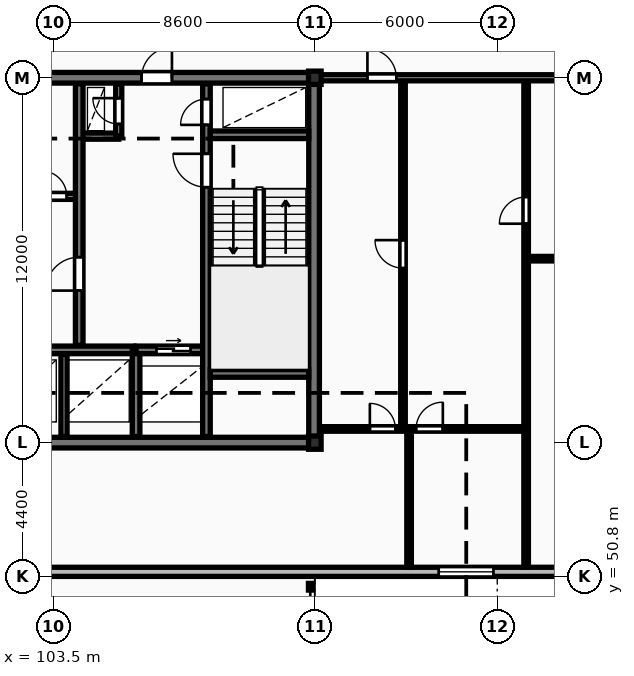
"""IFC4 building model, lengths in metres.
Left out: names, types, materials, properties, quantities, classifications, styles, units other than length and angle.
Written with IfcOpenShell. Run it as: python <this file> out.ifc"""

import sys

from ifc_helpers import new_model, si_unit, direction, frame, frame_2d, origin, origin_2d, place, context, subcontext, project, spatial, rectangle, i_section, extrude, element, fill, save


model = new_model("IFC4")
c1 = context("Model", 3, precision=1e-05, world=origin(), true_north=direction((0.0, 1.0)))
c2 = subcontext(c1, "Body", "Model", "MODEL_VIEW")
j1 = project(units=[si_unit("LENGTHUNIT", "METRE"), si_unit("PLANEANGLEUNIT", "RADIAN")], contexts=[c1])
p1 = place(None, origin())
s1 = spatial("IfcSite", under=j1, at=p1, CompositionType="ELEMENT")
p2 = place(p1, origin())
s2 = spatial("IfcBuilding", under=s1, at=p2, CompositionType="ELEMENT")
p3 = place(p2, frame((0.0, 0.0, 150.1)))
s3 = spatial("IfcBuildingStorey", under=s2, at=p3, CompositionType="ELEMENT", Elevation=150.1)
for number, where, z_axis, x_axis in (
    (1, (112.1, 55.2, 0.0), (0.0, 0.0, 1.0), (1.0, 0.0, 0.0)),
    (2, (112.1, 67.2, 0.0), (0.0, 0.0, 1.0), (1.0, 0.0, 0.0)),
):
    element("IfcColumn", number, at=place(p3, frame(where, z_axis=z_axis, x_axis=x_axis)), inside=s3, PredefinedType="COLUMN", context=c2, shape_type="SweptSolid", body=[
        extrude(i_section(OverallWidth=0.412, OverallDepth=0.437, WebThickness=0.036, FlangeThickness=0.052, FilletRadius=0.015, at=origin_2d()), origin(), (0.0, 0.0, 1.0), 3.6),
    ])
p4 = place(p3, frame((57.6, 50.95, 0.0), z_axis=(0.0, 0.0, 1.0), x_axis=(1.0, 0.0, 0.0)))
e3 = element("IfcWall", 3, at=p4, inside=s3, PredefinedType="STANDARD", context=c2, shape_type="SweptSolid", body=[
    extrude(rectangle(XDim=73.0, YDim=0.3, at=frame_2d((36.5, 0.0))), origin(), (0.0, 0.0, 1.0), 3.31),
])
p5 = place(p4, frame((15.225, 0.0, 0.85)))
e4 = element("IfcOpeningElement", 4, at=p5, cuts=e3, PredefinedType="OPENING", context=c2, shape_type="SweptSolid", body=[
    extrude(rectangle(XDim=1.8, YDim=1.8, at=frame_2d((0.9, 0.9))), frame((0.0, 0.16, 0.0), z_axis=(0.0, -1.0, 0.0), x_axis=(1.0, 0.0, 0.0)), (0.0, 0.0, 1.0), 0.32),
])
p6 = place(p4, frame((58.575, 0.0, 0.85)))
e5 = element("IfcOpeningElement", 5, at=p6, cuts=e3, PredefinedType="OPENING", context=c2, shape_type="SweptSolid", body=[
    extrude(rectangle(XDim=1.8, YDim=1.8, at=frame_2d((0.9, 0.9))), frame((0.0, 0.16, 0.0), z_axis=(0.0, -1.0, 0.0), x_axis=(1.0, 0.0, 0.0)), (0.0, 0.0, 1.0), 0.32),
])
p7 = place(p4, frame((33.45, 0.0, 0.0)))
e6 = element("IfcOpeningElement", 6, at=p7, cuts=e3, PredefinedType="OPENING", context=c2, shape_type="SweptSolid", body=[
    extrude(rectangle(XDim=1.1, YDim=2.1, at=frame_2d((0.55, 1.05))), frame((0.0, 0.16, 0.0), z_axis=(0.0, -1.0, 0.0), x_axis=(1.0, 0.0, 0.0)), (0.0, 0.0, 1.0), 0.32),
])
p8 = place(p3, frame((75.95, 55.2, 0.0), z_axis=(0.0, 0.0, 1.0), x_axis=(1.0, 0.0, 0.0)))
e7 = element("IfcWall", 7, at=p8, inside=s3, PredefinedType="SHEAR", context=c2, shape_type="SweptSolid", body=[
    extrude(rectangle(XDim=36.3, YDim=0.35, at=frame_2d((18.15, 0.0))), origin(), (0.0, 0.0, 1.0), 3.6),
])
p9 = place(p8, frame((15.1, 0.0, 0.0)))
e8 = element("IfcOpeningElement", 8, at=p9, cuts=e7, PredefinedType="OPENING", context=c2, shape_type="SweptSolid", body=[
    extrude(rectangle(XDim=1.1, YDim=2.1, at=frame_2d((0.55, 1.05))), frame((0.0, 0.185, 0.0), z_axis=(0.0, -1.0, 0.0), x_axis=(1.0, 0.0, 0.0)), (0.0, 0.0, 1.0), 0.37),
])
p10 = place(p3, frame((112.075, 55.375, 0.0), z_axis=(0.0, 0.0, 1.0), x_axis=(0.0, 1.0, 0.0)))
e9 = element("IfcWall", 9, at=p10, inside=s3, PredefinedType="SHEAR", context=c2, shape_type="SweptSolid", body=[
    extrude(rectangle(XDim=11.65, YDim=0.35, at=frame_2d((5.825, 0.0))), origin(), (0.0, 0.0, 1.0), 3.6),
])
p11 = place(p3, frame((75.95, 67.2, 0.0), z_axis=(0.0, 0.0, 1.0), x_axis=(1.0, 0.0, 0.0)))
e10 = element("IfcWall", 10, at=p11, inside=s3, PredefinedType="SHEAR", context=c2, shape_type="SweptSolid", body=[
    extrude(rectangle(XDim=36.3, YDim=0.35, at=frame_2d((18.15, 0.0))), origin(), (0.0, 0.0, 1.0), 3.6),
])
p12 = place(p11, frame((5.25, 0.0, 0.0)))
e11 = element("IfcOpeningElement", 11, at=p12, cuts=e10, PredefinedType="OPENING", context=c2, shape_type="SweptSolid", body=[
    extrude(rectangle(XDim=1.0, YDim=2.15, at=frame_2d((0.5, 1.075))), frame((0.0, 0.185, 0.0), z_axis=(0.0, -1.0, 0.0), x_axis=(1.0, 0.0, 0.0)), (0.0, 0.0, 1.0), 0.37),
])
p13 = place(p11, frame((21.6, 0.0, 0.0)))
e12 = element("IfcOpeningElement", 12, at=p13, cuts=e10, PredefinedType="OPENING", context=c2, shape_type="SweptSolid", body=[
    extrude(rectangle(XDim=1.5, YDim=2.2, at=frame_2d((0.75, 1.1))), frame((0.0, 0.185, 0.0), z_axis=(0.0, -1.0, 0.0), x_axis=(1.0, 0.0, 0.0)), (0.0, 0.0, 1.0), 0.37),
])
p14 = place(p11, frame((30.45, 0.0, 0.0)))
e13 = element("IfcOpeningElement", 13, at=p14, cuts=e10, PredefinedType="OPENING", context=c2, shape_type="SweptSolid", body=[
    extrude(rectangle(XDim=1.0, YDim=2.15, at=frame_2d((0.5, 1.075))), frame((0.0, 0.185, 0.0), z_axis=(0.0, -1.0, 0.0), x_axis=(1.0, 0.0, 0.0)), (0.0, 0.0, 1.0), 0.37),
])
p15 = place(p3, frame((103.85, 55.4, 0.0), z_axis=(0.0, 0.0, 1.0), x_axis=(0.0, 1.0, 0.0)))
e14 = element("IfcWall", 14, at=p15, inside=s3, PredefinedType="PARTITIONING", context=c2, shape_type="SweptSolid", body=[
    extrude(rectangle(XDim=2.72, YDim=0.2, at=frame_2d((1.36, 0.0))), origin(), (0.0, 0.0, 1.0), 3.31),
])
p16 = place(p3, frame((101.55, 58.25, 0.0), z_axis=(0.0, 0.0, 1.0), x_axis=(1.0, 0.0, 0.0)))
e15 = element("IfcWall", 15, at=p16, inside=s3, PredefinedType="SHEAR", context=c2, shape_type="SweptSolid", body=[
    extrude(rectangle(XDim=4.6, YDim=0.25, at=frame_2d((2.3, 0.0))), origin(), (0.0, 0.0, 1.0), 3.6),
])
p17 = place(p3, frame((106.22, 55.4, 0.0), z_axis=(0.0, 0.0, 1.0), x_axis=(0.0, 1.0, 0.0)))
e16 = element("IfcWall", 16, at=p17, inside=s3, PredefinedType="SHEAR", context=c2, shape_type="SweptSolid", body=[
    extrude(rectangle(XDim=2.85, YDim=0.25, at=frame_2d((1.425, 0.0))), origin(), (0.0, 0.0, 1.0), 3.6),
])
p18 = place(p3, frame((106.22, 58.25, 0.0), z_axis=(0.0, 0.0, 1.0), x_axis=(1.0, 0.0, 0.0)))
e17 = element("IfcWall", 17, at=p18, inside=s3, PredefinedType="SHEAR", context=c2, shape_type="SweptSolid", body=[
    extrude(rectangle(XDim=2.46, YDim=0.25, at=frame_2d((1.23, 0.0))), origin(), (0.0, 0.0, 1.0), 3.6),
])
p19 = place(p18, frame((0.67, 0.0, 0.0)))
e18 = element("IfcOpeningElement", 18, at=p19, cuts=e17, PredefinedType="OPENING", context=c2, shape_type="SweptSolid", body=[
    extrude(rectangle(XDim=1.12, YDim=2.12, at=frame_2d((0.56, 1.06))), frame((0.0, 0.135, 0.0), z_axis=(0.0, -1.0, 0.0), x_axis=(1.0, 0.0, 0.0)), (0.0, 0.0, 1.0), 0.27),
])
p20 = place(p3, frame((84.42, 63.3, 0.0), z_axis=(0.0, 0.0, 1.0), x_axis=(1.0, 0.0, 0.0)))
e19 = element("IfcWall", 19, at=p20, inside=s3, PredefinedType="PARTITIONING", context=c2, shape_type="SweptSolid", body=[
    extrude(rectangle(XDim=19.83, YDim=0.2, at=frame_2d((9.915, 0.0))), origin(), (0.0, 0.0, 1.0), 3.31),
])
p21 = place(p20, frame((1.15, 0.0, 0.0)))
e20 = element("IfcOpeningElement", 20, at=p21, cuts=e19, PredefinedType="OPENING", context=c2, shape_type="SweptSolid", body=[
    extrude(rectangle(XDim=0.85, YDim=2.05, at=frame_2d((0.425, 1.025))), frame((0.0, 0.11, 0.0), z_axis=(0.0, -1.0, 0.0), x_axis=(1.0, 0.0, 0.0)), (0.0, 0.0, 1.0), 0.22),
])
p22 = place(p20, frame((3.25, 0.0, 0.0)))
e21 = element("IfcOpeningElement", 21, at=p22, cuts=e19, PredefinedType="OPENING", context=c2, shape_type="SweptSolid", body=[
    extrude(rectangle(XDim=0.85, YDim=2.05, at=frame_2d((0.425, 1.025))), frame((0.0, 0.11, 0.0), z_axis=(0.0, -1.0, 0.0), x_axis=(1.0, 0.0, 0.0)), (0.0, 0.0, 1.0), 0.22),
])
p23 = place(p20, frame((13.08, 0.0, 0.0)))
e22 = element("IfcOpeningElement", 22, at=p23, cuts=e19, PredefinedType="OPENING", context=c2, shape_type="SweptSolid", body=[
    extrude(rectangle(XDim=1.5, YDim=2.2, at=frame_2d((0.75, 1.1))), frame((0.0, 0.11, 0.0), z_axis=(0.0, -1.0, 0.0), x_axis=(1.0, 0.0, 0.0)), (0.0, 0.0, 1.0), 0.22),
])
p24 = place(p20, frame((5.53, 0.0, 0.0)))
e23 = element("IfcOpeningElement", 23, at=p24, cuts=e19, PredefinedType="OPENING", context=c2, shape_type="SweptSolid", body=[
    extrude(rectangle(XDim=0.88, YDim=2.06, at=frame_2d((0.44, 1.03))), frame((0.0, 0.11, 0.0), z_axis=(0.0, -1.0, 0.0), x_axis=(1.0, 0.0, 0.0)), (0.0, 0.0, 1.0), 0.22),
])
p25 = place(p20, frame((7.68, 0.0, 0.0)))
e24 = element("IfcOpeningElement", 24, at=p25, cuts=e19, PredefinedType="OPENING", context=c2, shape_type="SweptSolid", body=[
    extrude(rectangle(XDim=0.88, YDim=2.06, at=frame_2d((0.44, 1.03))), frame((0.0, 0.11, 0.0), z_axis=(0.0, -1.0, 0.0), x_axis=(1.0, 0.0, 0.0)), (0.0, 0.0, 1.0), 0.22),
])
p26 = place(p20, frame((10.43, 0.0, 0.0)))
e25 = element("IfcOpeningElement", 25, at=p26, cuts=e19, PredefinedType="OPENING", context=c2, shape_type="SweptSolid", body=[
    extrude(rectangle(XDim=0.85, YDim=2.05, at=frame_2d((0.425, 1.025))), frame((0.0, 0.11, 0.0), z_axis=(0.0, -1.0, 0.0), x_axis=(1.0, 0.0, 0.0)), (0.0, 0.0, 1.0), 0.22),
])
p27 = place(p20, frame((16.23, 0.0, 0.0)))
e26 = element("IfcOpeningElement", 26, at=p27, cuts=e19, PredefinedType="OPENING", context=c2, shape_type="SweptSolid", body=[
    extrude(rectangle(XDim=0.96, YDim=2.1, at=frame_2d((0.48, 1.05))), frame((0.0, 0.11, 0.0), z_axis=(0.0, -1.0, 0.0), x_axis=(1.0, 0.0, 0.0)), (0.0, 0.0, 1.0), 0.22),
])
p28 = place(p20, frame((18.68, 0.0, 0.0)))
e27 = element("IfcOpeningElement", 27, at=p28, cuts=e19, PredefinedType="OPENING", context=c2, shape_type="SweptSolid", body=[
    extrude(rectangle(XDim=0.84, YDim=2.04, at=frame_2d((0.42, 1.02))), frame((0.0, 0.11, 0.0), z_axis=(0.0, -1.0, 0.0), x_axis=(1.0, 0.0, 0.0)), (0.0, 0.0, 1.0), 0.22),
])
p29 = place(p3, frame((104.45, 65.28, 0.0), z_axis=(0.0, 0.0, 1.0), x_axis=(1.0, 0.0, 0.0)))
e28 = element("IfcWall", 28, at=p29, inside=s3, PredefinedType="PARTITIONING", context=c2, shape_type="SweptSolid", body=[
    extrude(rectangle(XDim=1.2, YDim=0.2, at=frame_2d((0.6, 0.0))), origin(), (0.0, 0.0, 1.0), 3.31),
])
p30 = place(p3, frame((105.65, 65.28, 0.0), z_axis=(0.0, 0.0, 1.0), x_axis=(0.0, 1.0, 0.0)))
e29 = element("IfcWall", 29, at=p30, inside=s3, PredefinedType="PARTITIONING", context=c2, shape_type="SweptSolid", body=[
    extrude(rectangle(XDim=1.72, YDim=0.2, at=frame_2d((0.86, 0.0))), origin(), (0.0, 0.0, 1.0), 3.31),
])
p31 = place(p30, frame((0.4, 0.0, 0.0)))
e30 = element("IfcOpeningElement", 30, at=p31, cuts=e29, PredefinedType="OPENING", context=c2, shape_type="SweptSolid", body=[
    extrude(rectangle(XDim=0.85, YDim=2.05, at=frame_2d((0.425, 1.025))), frame((0.0, 0.11, 0.0), z_axis=(0.0, -1.0, 0.0), x_axis=(1.0, 0.0, 0.0)), (0.0, 0.0, 1.0), 0.22),
])
p32 = place(p3, frame((104.35, 58.4, 0.0), z_axis=(0.0, 0.0, 1.0), x_axis=(0.0, 1.0, 0.0)))
e31 = element("IfcWall", 31, at=p32, inside=s3, PredefinedType="SHEAR", context=c2, shape_type="SweptSolid", body=[
    extrude(rectangle(XDim=8.6, YDim=0.25, at=frame_2d((4.3, 0.0))), origin(), (0.0, 0.0, 1.0), 3.6),
])
p33 = place(p32, frame((1.8, 0.0, 0.0)))
e32 = element("IfcOpeningElement", 32, at=p33, cuts=e31, PredefinedType="OPENING", context=c2, shape_type="SweptSolid", body=[
    extrude(rectangle(XDim=1.1, YDim=2.1, at=frame_2d((0.55, 1.05))), frame((0.0, 0.135, 0.0), z_axis=(0.0, -1.0, 0.0), x_axis=(1.0, 0.0, 0.0)), (0.0, 0.0, 1.0), 0.27),
])
p34 = place(p3, frame((108.535, 55.4, 0.0), z_axis=(0.0, 0.0, 1.0), x_axis=(0.0, 1.0, 0.0)))
e33 = element("IfcWall", 33, at=p34, inside=s3, PredefinedType="SHEAR", context=c2, shape_type="SweptSolid", body=[
    extrude(rectangle(XDim=11.6, YDim=0.25, at=frame_2d((5.8, 0.0))), origin(), (0.0, 0.0, 1.0), 3.6),
])
p35 = place(p34, frame((8.2, 0.0, 0.0)))
e34 = element("IfcOpeningElement", 34, at=p35, cuts=e33, PredefinedType="OPENING", context=c2, shape_type="SweptSolid", body=[
    extrude(rectangle(XDim=1.1, YDim=2.1, at=frame_2d((0.55, 1.05))), frame((0.0, 0.135, 0.0), z_axis=(0.0, -1.0, 0.0), x_axis=(1.0, 0.0, 0.0)), (0.0, 0.0, 1.0), 0.27),
])
p36 = place(p34, frame((10.25, 0.0, 0.0)))
e35 = element("IfcOpeningElement", 35, at=p36, cuts=e33, PredefinedType="OPENING", context=c2, shape_type="SweptSolid", body=[
    extrude(rectangle(XDim=0.85, YDim=2.05, at=frame_2d((0.425, 1.025))), frame((0.0, 0.135, 0.0), z_axis=(0.0, -1.0, 0.0), x_axis=(1.0, 0.0, 0.0)), (0.0, 0.0, 1.0), 0.27),
])
for number, where, z_axis, x_axis in (
    (36, (108.66, 57.475, 0.0), (0.0, 0.0, 1.0), (1.0, 0.0, 0.0)),
    (37, (108.66, 65.325, 0.0), (0.0, 0.0, 1.0), (1.0, 0.0, 0.0)),
):
    element("IfcWall", number, at=place(p3, frame(where, z_axis=z_axis, x_axis=x_axis)), inside=s3, PredefinedType="SHEAR", context=c2, shape_type="SweptSolid", body=[
        extrude(rectangle(XDim=3.24, YDim=0.25, at=frame_2d((1.62, 0.0))), origin(), (0.0, 0.0, 1.0), 3.6),
    ])
p37 = place(p3, frame((119.05, 61.25, 0.0), z_axis=(0.0, 0.0, 1.0), x_axis=(1.0, 0.0, 0.0)))
e38 = element("IfcWall", 38, at=p37, inside=s3, PredefinedType="PARTITIONING", context=c2, shape_type="SweptSolid", body=[
    extrude(rectangle(XDim=11.55, YDim=0.15, at=frame_2d((5.775, 0.0))), origin(), (0.0, 0.0, 1.0), 3.31),
])
p38 = place(p37, frame((5.355, 0.0, 0.0)))
e39 = element("IfcOpeningElement", 39, at=p38, cuts=e38, PredefinedType="OPENING", context=c2, shape_type="SweptSolid", body=[
    extrude(rectangle(XDim=0.84, YDim=2.04, at=frame_2d((0.42, 1.02))), frame((0.0, 0.085, 0.0), z_axis=(0.0, -1.0, 0.0), x_axis=(1.0, 0.0, 0.0)), (0.0, 0.0, 1.0), 0.17),
])
p39 = place(p3, frame((119.05, 51.1, 0.0), z_axis=(0.0, 0.0, 1.0), x_axis=(0.0, 1.0, 0.0)))
e40 = element("IfcWall", 40, at=p39, inside=s3, PredefinedType="PARTITIONING", context=c2, shape_type="SweptSolid", body=[
    extrude(rectangle(XDim=16.05, YDim=0.15, at=frame_2d((8.025, 0.0))), origin(), (0.0, 0.0, 1.0), 3.31),
])
p40 = place(p39, frame((11.3, 0.0, 0.0)))
e41 = element("IfcOpeningElement", 41, at=p40, cuts=e40, PredefinedType="OPENING", context=c2, shape_type="SweptSolid", body=[
    extrude(rectangle(XDim=0.88, YDim=2.06, at=frame_2d((0.44, 1.03))), frame((0.0, 0.085, 0.0), z_axis=(0.0, -1.0, 0.0), x_axis=(1.0, 0.0, 0.0)), (0.0, 0.0, 1.0), 0.17),
])
p41 = place(p3, frame((115.0, 55.65, 0.0), z_axis=(0.0, 0.0, 1.0), x_axis=(0.0, 1.0, 0.0)))
e42 = element("IfcWall", 42, at=p41, inside=s3, PredefinedType="PARTITIONING", context=c2, shape_type="SweptSolid", body=[
    extrude(rectangle(XDim=11.5, YDim=0.15, at=frame_2d((5.75, 0.0))), origin(), (0.0, 0.0, 1.0), 3.31),
])
p42 = place(p41, frame((5.29, 0.0, 0.0)))
e43 = element("IfcOpeningElement", 43, at=p42, cuts=e42, PredefinedType="OPENING", context=c2, shape_type="SweptSolid", body=[
    extrude(rectangle(XDim=0.92, YDim=2.08, at=frame_2d((0.46, 1.04))), frame((0.0, 0.085, 0.0), z_axis=(0.0, -1.0, 0.0), x_axis=(1.0, 0.0, 0.0)), (0.0, 0.0, 1.0), 0.17),
])
p43 = place(p3, frame((115.2, 51.1, 0.0), z_axis=(0.0, 0.0, 1.0), x_axis=(0.0, 1.0, 0.0)))
e44 = element("IfcWall", 44, at=p43, inside=s3, PredefinedType="PARTITIONING", context=c2, shape_type="SweptSolid", body=[
    extrude(rectangle(XDim=4.55, YDim=0.15, at=frame_2d((2.275, 0.0))), origin(), (0.0, 0.0, 1.0), 3.31),
])
p44 = place(p3, frame((112.27, 55.65, 0.0), z_axis=(0.0, 0.0, 1.0), x_axis=(1.0, 0.0, 0.0)))
e45 = element("IfcWall", 45, at=p44, inside=s3, PredefinedType="PARTITIONING", context=c2, shape_type="SweptSolid", body=[
    extrude(rectangle(XDim=6.76, YDim=0.15, at=frame_2d((3.38, 0.0))), origin(), (0.0, 0.0, 1.0), 3.31),
])
p45 = place(p44, frame((1.64, 0.0, 0.0)))
e46 = element("IfcOpeningElement", 46, at=p45, cuts=e45, PredefinedType="OPENING", context=c2, shape_type="SweptSolid", body=[
    extrude(rectangle(XDim=0.84, YDim=2.04, at=frame_2d((0.42, 1.02))), frame((0.0, 0.085, 0.0), z_axis=(0.0, -1.0, 0.0), x_axis=(1.0, 0.0, 0.0)), (0.0, 0.0, 1.0), 0.17),
])
p46 = place(p44, frame((3.16, 0.0, 0.0)))
e47 = element("IfcOpeningElement", 47, at=p46, cuts=e45, PredefinedType="OPENING", context=c2, shape_type="SweptSolid", body=[
    extrude(rectangle(XDim=0.88, YDim=2.06, at=frame_2d((0.44, 1.03))), frame((0.0, 0.085, 0.0), z_axis=(0.0, -1.0, 0.0), x_axis=(1.0, 0.0, 0.0)), (0.0, 0.0, 1.0), 0.17),
])
p47 = place(p3, frame((112.25, 67.2, 0.0), z_axis=(0.0, 0.0, 1.0), x_axis=(1.0, 0.0, 0.0)))
e48 = element("IfcWall", 48, at=p47, inside=s3, PredefinedType="PARTITIONING", context=c2, shape_type="SweptSolid", body=[
    extrude(rectangle(XDim=18.35, YDim=0.2, at=frame_2d((9.175, 0.0))), origin(), (0.0, 0.0, 1.0), 2.773),
])
p48 = place(p47, frame((1.58, 0.0, 0.0)))
e49 = element("IfcOpeningElement", 49, at=p48, cuts=e48, PredefinedType="OPENING", context=c2, shape_type="SweptSolid", body=[
    extrude(rectangle(XDim=0.95, YDim=2.15, at=frame_2d((0.475, 1.075))), frame((0.0, 0.11, 0.0), z_axis=(0.0, -1.0, 0.0), x_axis=(1.0, 0.0, 0.0)), (0.0, 0.0, 1.0), 0.22),
])
p49 = place(p6, origin())
e50 = element("IfcWindow", 50, at=p49, inside=s3, PartitioningType="SINGLE_PANEL", PredefinedType="WINDOW", context=c2, shape_type="SweptSolid", body=[
    extrude(rectangle(XDim=1.8, YDim=1.8, at=frame_2d((0.9, 0.9))), frame((0.0, 0.03, 0.0), z_axis=(0.0, -1.0, 0.0), x_axis=(1.0, 0.0, 0.0)), (0.0, 0.0, 1.0), 0.06),
])
fill(e5, e50)
p50 = place(p14, origin())
e51 = element("IfcDoor", 51, at=p50, inside=s3, OperationType="SINGLE_SWING_RIGHT", PredefinedType="DOOR", context=c2, shape_type="SweptSolid", body=[
    extrude(rectangle(XDim=1.0, YDim=2.15, at=frame_2d((0.5, 1.075))), frame((0.0, 0.025, 0.0), z_axis=(0.0, -1.0, 0.0), x_axis=(1.0, 0.0, 0.0)), (0.0, 0.0, 1.0), 0.05),
])
fill(e13, e51)
p51 = place(p19, origin())
e52 = element("IfcDoor", 52, at=p51, inside=s3, OperationType="SLIDING_TO_RIGHT", PredefinedType="DOOR", context=c2, shape_type="SweptSolid", body=[
    extrude(rectangle(XDim=1.12, YDim=2.12, at=frame_2d((0.56, 1.06))), frame((0.0, 0.025, 0.0), z_axis=(0.0, -1.0, 0.0), x_axis=(1.0, 0.0, 0.0)), (0.0, 0.0, 1.0), 0.05),
])
fill(e18, e52)
p52 = place(p28, origin())
e53 = element("IfcDoor", 53, at=p52, inside=s3, OperationType="SINGLE_SWING_LEFT", PredefinedType="DOOR", context=c2, shape_type="SweptSolid", body=[
    extrude(rectangle(XDim=0.84, YDim=2.04, at=frame_2d((0.42, 1.02))), frame((0.0, 0.025, 0.0), z_axis=(0.0, -1.0, 0.0), x_axis=(1.0, 0.0, 0.0)), (0.0, 0.0, 1.0), 0.05),
])
fill(e27, e53)
p53 = place(p31, origin())
e54 = element("IfcDoor", 54, at=p53, inside=s3, OperationType="SINGLE_SWING_RIGHT", PredefinedType="DOOR", context=c2, shape_type="SweptSolid", body=[
    extrude(rectangle(XDim=0.85, YDim=2.05, at=frame_2d((0.425, 1.025))), frame((0.0, 0.025, 0.0), z_axis=(0.0, -1.0, 0.0), x_axis=(1.0, 0.0, 0.0)), (0.0, 0.0, 1.0), 0.05),
])
fill(e30, e54)
p54 = place(p33, origin())
e55 = element("IfcDoor", 55, at=p54, inside=s3, OperationType="SINGLE_SWING_LEFT", PredefinedType="DOOR", context=c2, shape_type="SweptSolid", body=[
    extrude(rectangle(XDim=1.1, YDim=2.1, at=frame_2d((0.55, 1.05))), frame((0.0, 0.025, 0.0), z_axis=(0.0, -1.0, 0.0), x_axis=(1.0, 0.0, 0.0)), (0.0, 0.0, 1.0), 0.05),
])
fill(e32, e55)
p55 = place(p35, origin())
e56 = element("IfcDoor", 56, at=p55, inside=s3, OperationType="SINGLE_SWING_RIGHT", PredefinedType="DOOR", context=c2, shape_type="SweptSolid", body=[
    extrude(rectangle(XDim=1.1, YDim=2.1, at=frame_2d((0.55, 1.05))), frame((0.0, 0.025, 0.0), z_axis=(0.0, -1.0, 0.0), x_axis=(1.0, 0.0, 0.0)), (0.0, 0.0, 1.0), 0.05),
])
fill(e34, e56)
p56 = place(p36, origin())
e57 = element("IfcDoor", 57, at=p56, inside=s3, OperationType="SINGLE_SWING_LEFT", PredefinedType="DOOR", context=c2, shape_type="SweptSolid", body=[
    extrude(rectangle(XDim=0.85, YDim=2.05, at=frame_2d((0.425, 1.025))), frame((0.0, 0.025, 0.0), z_axis=(0.0, -1.0, 0.0), x_axis=(1.0, 0.0, 0.0)), (0.0, 0.0, 1.0), 0.05),
])
fill(e35, e57)
p57 = place(p40, origin())
e58 = element("IfcDoor", 58, at=p57, inside=s3, OperationType="SINGLE_SWING_LEFT", PredefinedType="DOOR", context=c2, shape_type="SweptSolid", body=[
    extrude(rectangle(XDim=0.88, YDim=2.06, at=frame_2d((0.44, 1.03))), frame((0.0, 0.025, 0.0), z_axis=(0.0, -1.0, 0.0), x_axis=(1.0, 0.0, 0.0)), (0.0, 0.0, 1.0), 0.05),
])
fill(e41, e58)
p58 = place(p42, origin())
e59 = element("IfcDoor", 59, at=p58, inside=s3, OperationType="SINGLE_SWING_RIGHT", PredefinedType="DOOR", context=c2, shape_type="SweptSolid", body=[
    extrude(rectangle(XDim=0.92, YDim=2.08, at=frame_2d((0.46, 1.04))), frame((0.0, 0.025, 0.0), z_axis=(0.0, -1.0, 0.0), x_axis=(1.0, 0.0, 0.0)), (0.0, 0.0, 1.0), 0.05),
])
fill(e43, e59)
p59 = place(p45, origin())
e60 = element("IfcDoor", 60, at=p59, inside=s3, OperationType="SINGLE_SWING_LEFT", PredefinedType="DOOR", context=c2, shape_type="SweptSolid", body=[
    extrude(rectangle(XDim=0.84, YDim=2.04, at=frame_2d((0.42, 1.02))), frame((0.0, 0.025, 0.0), z_axis=(0.0, -1.0, 0.0), x_axis=(1.0, 0.0, 0.0)), (0.0, 0.0, 1.0), 0.05),
])
fill(e46, e60)
p60 = place(p46, origin())
e61 = element("IfcDoor", 61, at=p60, inside=s3, OperationType="SINGLE_SWING_RIGHT", PredefinedType="DOOR", context=c2, shape_type="SweptSolid", body=[
    extrude(rectangle(XDim=0.88, YDim=2.06, at=frame_2d((0.44, 1.03))), frame((0.0, 0.025, 0.0), z_axis=(0.0, -1.0, 0.0), x_axis=(1.0, 0.0, 0.0)), (0.0, 0.0, 1.0), 0.05),
])
fill(e47, e61)
p61 = place(p48, origin())
e62 = element("IfcDoor", 62, at=p61, inside=s3, OperationType="SINGLE_SWING_LEFT", PredefinedType="DOOR", context=c2, shape_type="SweptSolid", body=[
    extrude(rectangle(XDim=0.95, YDim=2.15, at=frame_2d((0.475, 1.075))), frame((0.0, 0.025, 0.0), z_axis=(0.0, -1.0, 0.0), x_axis=(1.0, 0.0, 0.0)), (0.0, 0.0, 1.0), 0.05),
])
fill(e49, e62)
save(model, sys.argv[1])
